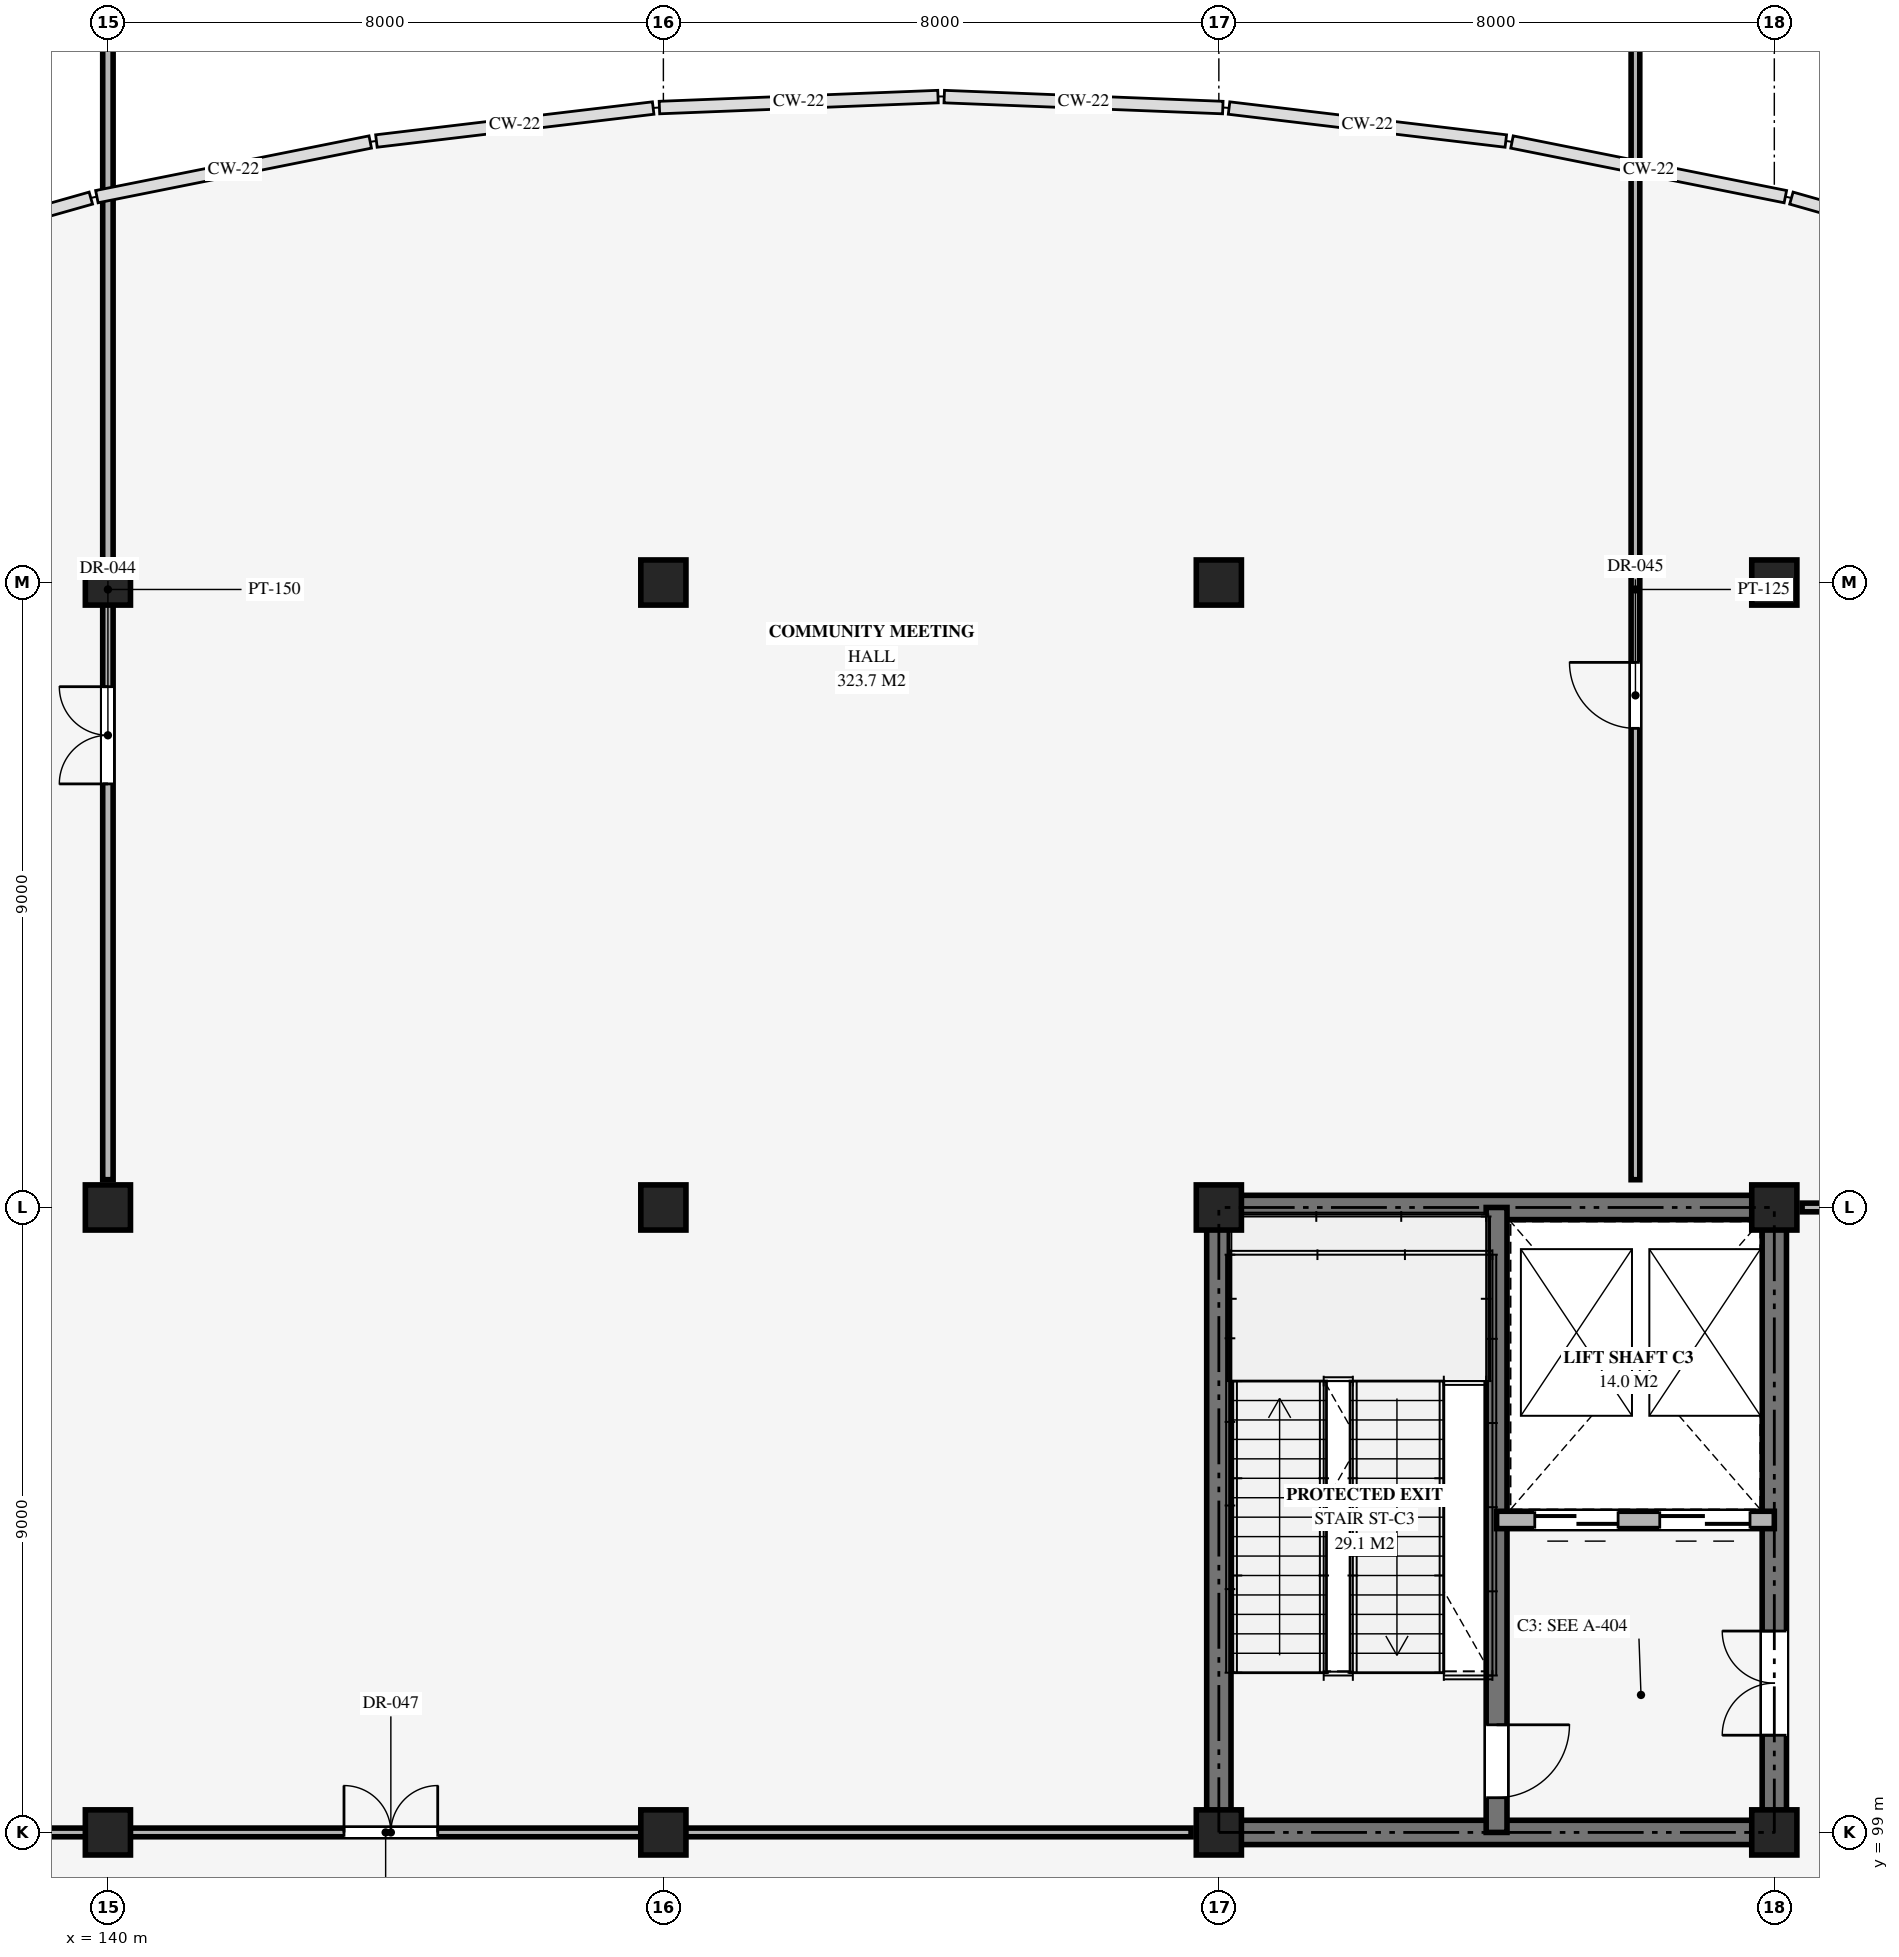
"""IFC4 building model, lengths in metres.
Left out: names, types, materials, properties, quantities, classifications, styles, units other than length and angle.
Written with IfcOpenShell. Run it as: python <this file> out.ifc"""

import sys

from ifc_helpers import new_model, si_unit, direction, frame, frame_2d, origin, origin_2d, place, context, subcontext, project, spatial, rectangle, extrude, element, fill, save


model = new_model("IFC4")
c1 = context("Model", 3, precision=1e-05, world=origin(), true_north=direction((0.0, 1.0)))
c2 = subcontext(c1, "Body", "Model", "MODEL_VIEW")
j1 = project(units=[si_unit("LENGTHUNIT", "METRE"), si_unit("PLANEANGLEUNIT", "RADIAN")], contexts=[c1])
p1 = place(None, origin())
s1 = spatial("IfcSite", under=j1, at=p1, CompositionType="ELEMENT")
p2 = place(p1, origin())
s2 = spatial("IfcBuilding", under=s1, at=p2, CompositionType="ELEMENT")
p3 = place(p2, frame((0.0, 0.0, 15.0)))
s3 = spatial("IfcBuildingStorey", under=s2, at=p3, CompositionType="ELEMENT", Elevation=15.0)
for number, where, z_axis, x_axis in (
    (1, (140.0, 99.0, 0.0), (0.0, 0.0, 1.0), (1.0, 0.0, 0.0)),
    (2, (140.0, 108.0, 0.0), (0.0, 0.0, 1.0), (1.0, 0.0, 0.0)),
    (3, (140.0, 117.0, 0.0), (0.0, 0.0, 1.0), (1.0, 0.0, 0.0)),
    (4, (148.0, 99.0, 0.0), (0.0, 0.0, 1.0), (1.0, 0.0, 0.0)),
    (5, (148.0, 108.0, 0.0), (0.0, 0.0, 1.0), (1.0, 0.0, 0.0)),
    (6, (148.0, 117.0, 0.0), (0.0, 0.0, 1.0), (1.0, 0.0, 0.0)),
    (7, (156.0, 99.0, 0.0), (0.0, 0.0, 1.0), (1.0, 0.0, 0.0)),
    (8, (156.0, 108.0, 0.0), (0.0, 0.0, 1.0), (1.0, 0.0, 0.0)),
    (9, (156.0, 117.0, 0.0), (0.0, 0.0, 1.0), (1.0, 0.0, 0.0)),
    (10, (164.0, 99.0, 0.0), (0.0, 0.0, 1.0), (1.0, 0.0, 0.0)),
    (11, (164.0, 108.0, 0.0), (0.0, 0.0, 1.0), (1.0, 0.0, 0.0)),
    (12, (164.0, 117.0, 0.0), (0.0, 0.0, 1.0), (1.0, 0.0, 0.0)),
):
    element("IfcColumn", number, at=place(p3, frame(where, z_axis=z_axis, x_axis=x_axis)), inside=s3, PredefinedType="COLUMN", context=c2, shape_type="SweptSolid", body=[
        extrude(rectangle(XDim=0.65, YDim=0.65, at=origin_2d()), origin(), (0.0, 0.0, 1.0), 4.34),
    ])
for number, where, z_axis, x_axis in (
    (13, (156.0, 99.0, 0.0), (0.0, 0.0, 1.0), (1.0, 0.0, 0.0)),
    (14, (156.0, 108.0, 0.0), (0.0, 0.0, 1.0), (1.0, 0.0, 0.0)),
):
    element("IfcWall", number, at=place(p3, frame(where, z_axis=z_axis, x_axis=x_axis)), inside=s3, PredefinedType="SHEAR", context=c2, shape_type="SweptSolid", body=[
        extrude(rectangle(XDim=8.0, YDim=0.35, at=frame_2d((4.0, 0.0))), origin(), (0.0, 0.0, 1.0), 4.48),
    ])
p4 = place(p3, frame((156.0, 99.0, 0.0), z_axis=(0.0, 0.0, 1.0), x_axis=(0.0, 1.0, 0.0)))
e15 = element("IfcWall", 15, at=p4, inside=s3, PredefinedType="SHEAR", context=c2, shape_type="SweptSolid", body=[
    extrude(rectangle(XDim=9.0, YDim=0.35, at=frame_2d((4.5, 0.0))), origin(), (0.0, 0.0, 1.0), 4.48),
])
p5 = place(p3, frame((164.0, 99.0, 0.0), z_axis=(0.0, 0.0, 1.0), x_axis=(0.0, 1.0, 0.0)))
e16 = element("IfcWall", 16, at=p5, inside=s3, PredefinedType="SHEAR", context=c2, shape_type="SweptSolid", body=[
    extrude(rectangle(XDim=9.0, YDim=0.35, at=frame_2d((4.5, 0.0))), origin(), (0.0, 0.0, 1.0), 4.48),
])
p6 = place(p5, frame((1.4, 0.0, 0.0)))
e17 = element("IfcOpeningElement", 17, at=p6, cuts=e16, PredefinedType="OPENING", context=c2, shape_type="SweptSolid", body=[
    extrude(rectangle(XDim=1.5, YDim=2.2, at=frame_2d((0.75, 1.1))), frame((0.0, 0.185, 0.0), z_axis=(0.0, -1.0, 0.0), x_axis=(1.0, 0.0, 0.0)), (0.0, 0.0, 1.0), 0.37),
])
p7 = place(p3, frame((160.0, 108.0, 0.0), z_axis=(0.0, 0.0, 1.0), x_axis=(0.0, -1.0, 0.0)))
e18 = element("IfcWall", 18, at=p7, inside=s3, PredefinedType="SHEAR", context=c2, shape_type="SweptSolid", body=[
    extrude(rectangle(XDim=9.0, YDim=0.3, at=frame_2d((4.5, 0.0))), origin(), (0.0, 0.0, 1.0), 4.48),
])
p8 = place(p7, frame((7.45, 0.0, 0.0)))
e19 = element("IfcOpeningElement", 19, at=p8, cuts=e18, PredefinedType="OPENING", context=c2, shape_type="SweptSolid", body=[
    extrude(rectangle(XDim=1.05, YDim=2.15, at=frame_2d((0.525, 1.075))), frame((0.0, 0.16, 0.0), z_axis=(0.0, -1.0, 0.0), x_axis=(1.0, 0.0, 0.0)), (0.0, 0.0, 1.0), 0.32),
])
p9 = place(p3, frame((164.0, 103.5, 0.0), z_axis=(0.0, 0.0, 1.0), x_axis=(-1.0, 0.0, 0.0)))
e20 = element("IfcWall", 20, at=p9, inside=s3, PredefinedType="SOLIDWALL", context=c2, shape_type="SweptSolid", body=[
    extrude(rectangle(XDim=4.0, YDim=0.25, at=frame_2d((2.0, 0.0))), origin(), (0.0, 0.0, 1.0), 3.45),
])
p10 = place(p9, frame((0.35, 0.0, 0.0)))
e21 = element("IfcOpeningElement", 21, at=p10, cuts=e20, PredefinedType="OPENING", context=c2, shape_type="SweptSolid", body=[
    extrude(rectangle(XDim=1.3, YDim=2.25, at=frame_2d((0.65, 1.125))), frame((0.0, 0.135, 0.0), z_axis=(0.0, -1.0, 0.0), x_axis=(1.0, 0.0, 0.0)), (0.0, 0.0, 1.0), 0.27),
])
p11 = place(p9, frame((2.25, 0.0, 0.0)))
e22 = element("IfcOpeningElement", 22, at=p11, cuts=e20, PredefinedType="OPENING", context=c2, shape_type="SweptSolid", body=[
    extrude(rectangle(XDim=1.2, YDim=2.2, at=frame_2d((0.6, 1.1))), frame((0.0, 0.135, 0.0), z_axis=(0.0, -1.0, 0.0), x_axis=(1.0, 0.0, 0.0)), (0.0, 0.0, 1.0), 0.27),
])
p12 = place(p3, frame((140.0, 108.4, 0.0), z_axis=(0.0, 0.0, 1.0), x_axis=(0.0, 1.0, 0.0)))
e23 = element("IfcWall", 23, at=p12, inside=s3, PredefinedType="PARTITIONING", context=c2, shape_type="SweptSolid", body=[
    extrude(rectangle(XDim=17.0, YDim=0.15, at=frame_2d((8.5, 0.0))), origin(), (0.0, 0.0, 1.0), 3.45),
])
p13 = place(p12, frame((5.7, 0.0, 0.0)))
e24 = element("IfcOpeningElement", 24, at=p13, cuts=e23, PredefinedType="OPENING", context=c2, shape_type="SweptSolid", body=[
    extrude(rectangle(XDim=1.4, YDim=2.15, at=frame_2d((0.7, 1.075))), frame((0.0, 0.085, 0.0), z_axis=(0.0, -1.0, 0.0), x_axis=(1.0, 0.0, 0.0)), (0.0, 0.0, 1.0), 0.17),
])
p14 = place(p3, frame((162.0, 108.4, 0.0), z_axis=(0.0, 0.0, 1.0), x_axis=(0.0, 1.0, 0.0)))
e25 = element("IfcWall", 25, at=p14, inside=s3, PredefinedType="PARTITIONING", context=c2, shape_type="SweptSolid", body=[
    extrude(rectangle(XDim=17.0, YDim=0.125, at=frame_2d((8.5, 0.0))), origin(), (0.0, 0.0, 1.0), 3.45),
])
p15 = place(p14, frame((6.5, 0.0, 0.0)))
e26 = element("IfcOpeningElement", 26, at=p15, cuts=e25, PredefinedType="OPENING", context=c2, shape_type="SweptSolid", body=[
    extrude(rectangle(XDim=0.95, YDim=2.1, at=frame_2d((0.475, 1.05))), frame((0.0, 0.073, 0.0), z_axis=(0.0, -1.0, 0.0), x_axis=(1.0, 0.0, 0.0)), (0.0, 0.0, 1.0), 0.145),
])
p16 = place(p3, frame((164.4, 108.0, 0.0), z_axis=(0.0, 0.0, 1.0), x_axis=(1.0, 0.0, 0.0)))
e27 = element("IfcWall", 27, at=p16, inside=s3, PredefinedType="PARTITIONING", context=c2, shape_type="SweptSolid", body=[
    extrude(rectangle(XDim=15.0, YDim=0.125, at=frame_2d((7.5, 0.0))), origin(), (0.0, 0.0, 1.0), 3.45),
])
p17 = place(p16, frame((4.9, 0.0, 0.0)))
e28 = element("IfcOpeningElement", 28, at=p17, cuts=e27, PredefinedType="OPENING", context=c2, shape_type="SweptSolid", body=[
    extrude(rectangle(XDim=0.95, YDim=2.1, at=frame_2d((0.475, 1.05))), frame((0.0, 0.073, 0.0), z_axis=(0.0, -1.0, 0.0), x_axis=(1.0, 0.0, 0.0)), (0.0, 0.0, 1.0), 0.145),
])
p18 = place(p3, frame((132.4, 99.0, 0.0), z_axis=(0.0, 0.0, 1.0), x_axis=(1.0, 0.0, 0.0)))
e29 = element("IfcWall", 29, at=p18, inside=s3, PredefinedType="PARTITIONING", context=c2, shape_type="SweptSolid", body=[
    extrude(rectangle(XDim=23.2, YDim=0.125, at=frame_2d((11.6, 0.0))), origin(), (0.0, 0.0, 1.0), 3.45),
])
p19 = place(p18, frame((11.0, 0.0, 0.0)))
e30 = element("IfcOpeningElement", 30, at=p19, cuts=e29, PredefinedType="OPENING", context=c2, shape_type="SweptSolid", body=[
    extrude(rectangle(XDim=1.35, YDim=2.15, at=frame_2d((0.675, 1.075))), frame((0.0, 0.073, 0.0), z_axis=(0.0, -1.0, 0.0), x_axis=(1.0, 0.0, 0.0)), (0.0, 0.0, 1.0), 0.145),
])
p20 = place(p10, origin())
e31 = element("IfcDoor", 31, at=p20, inside=s3, OperationType="DOUBLE_DOOR_SLIDING", PredefinedType="USERDEFINED", context=c2, shape_type="SweptSolid", body=[
    extrude(rectangle(XDim=1.3, YDim=2.25, at=frame_2d((0.65, 1.125))), frame((0.0, 0.025, 0.0), z_axis=(0.0, -1.0, 0.0), x_axis=(1.0, 0.0, 0.0)), (0.0, 0.0, 1.0), 0.05),
])
fill(e21, e31)
p21 = place(p11, origin())
e32 = element("IfcDoor", 32, at=p21, inside=s3, OperationType="DOUBLE_DOOR_SLIDING", PredefinedType="USERDEFINED", context=c2, shape_type="SweptSolid", body=[
    extrude(rectangle(XDim=1.2, YDim=2.2, at=frame_2d((0.6, 1.1))), frame((0.0, 0.025, 0.0), z_axis=(0.0, -1.0, 0.0), x_axis=(1.0, 0.0, 0.0)), (0.0, 0.0, 1.0), 0.05),
])
fill(e22, e32)
p22 = place(p8, origin())
e33 = element("IfcDoor", 33, at=p22, inside=s3, OperationType="SINGLE_SWING_LEFT", PredefinedType="DOOR", context=c2, shape_type="SweptSolid", body=[
    extrude(rectangle(XDim=1.05, YDim=2.15, at=frame_2d((0.525, 1.075))), frame((0.0, 0.025, 0.0), z_axis=(0.0, -1.0, 0.0), x_axis=(1.0, 0.0, 0.0)), (0.0, 0.0, 1.0), 0.05),
])
fill(e19, e33)
p23 = place(p6, origin())
e34 = element("IfcDoor", 34, at=p23, inside=s3, OperationType="DOUBLE_DOOR_SINGLE_SWING", PredefinedType="DOOR", context=c2, shape_type="SweptSolid", body=[
    extrude(rectangle(XDim=1.5, YDim=2.2, at=frame_2d((0.75, 1.1))), frame((0.0, 0.025, 0.0), z_axis=(0.0, -1.0, 0.0), x_axis=(1.0, 0.0, 0.0)), (0.0, 0.0, 1.0), 0.05),
])
fill(e17, e34)
p24 = place(p13, origin())
e35 = element("IfcDoor", 35, at=p24, inside=s3, OperationType="DOUBLE_DOOR_SINGLE_SWING", PredefinedType="DOOR", context=c2, shape_type="SweptSolid", body=[
    extrude(rectangle(XDim=1.4, YDim=2.15, at=frame_2d((0.7, 1.075))), frame((0.0, 0.025, 0.0), z_axis=(0.0, -1.0, 0.0), x_axis=(1.0, 0.0, 0.0)), (0.0, 0.0, 1.0), 0.05),
])
fill(e24, e35)
p25 = place(p15, origin())
e36 = element("IfcDoor", 36, at=p25, inside=s3, OperationType="SINGLE_SWING_RIGHT", PredefinedType="DOOR", context=c2, shape_type="SweptSolid", body=[
    extrude(rectangle(XDim=0.95, YDim=2.1, at=frame_2d((0.475, 1.05))), frame((0.0, 0.025, 0.0), z_axis=(0.0, -1.0, 0.0), x_axis=(1.0, 0.0, 0.0)), (0.0, 0.0, 1.0), 0.05),
])
fill(e26, e36)
p26 = place(p19, origin())
e37 = element("IfcDoor", 37, at=p26, inside=s3, OperationType="DOUBLE_DOOR_SINGLE_SWING", PredefinedType="DOOR", context=c2, shape_type="SweptSolid", body=[
    extrude(rectangle(XDim=1.35, YDim=2.15, at=frame_2d((0.675, 1.075))), frame((0.0, 0.025, 0.0), z_axis=(0.0, -1.0, 0.0), x_axis=(1.0, 0.0, 0.0)), (0.0, 0.0, 1.0), 0.05),
])
fill(e30, e37)
save(model, sys.argv[1])
